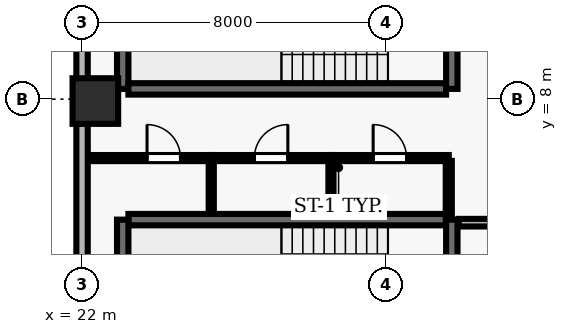
"""IFC4 building model, lengths in metres.
Left out: names, types, materials, properties, quantities, classifications, styles, units other than length and angle.
Written with IfcOpenShell. Run it as: python <this file> out.ifc"""

import sys

from ifc_helpers import new_model, si_unit, direction, frame, frame_2d, origin, origin_2d, place, context, subcontext, project, spatial, rectangle, extrude, element, fill, save


model = new_model("IFC4")
c1 = context("Model", 3, precision=1e-05, world=origin(), true_north=direction((0.0, 1.0)))
c2 = subcontext(c1, "Body", "Model", "MODEL_VIEW")
j1 = project(units=[si_unit("LENGTHUNIT", "METRE"), si_unit("PLANEANGLEUNIT", "RADIAN")], contexts=[c1])
p1 = place(None, origin())
s1 = spatial("IfcSite", under=j1, at=p1, CompositionType="ELEMENT")
p2 = place(p1, origin())
s2 = spatial("IfcBuilding", under=s1, at=p2, CompositionType="ELEMENT")
p3 = place(p2, frame((0.0, 0.0, 122.9)))
s3 = spatial("IfcBuildingStorey", under=s2, at=p3, CompositionType="ELEMENT", Elevation=122.9)
p4 = place(p3, frame((22.35, 7.95, 0.0), z_axis=(0.0, 0.0, 1.0), x_axis=(1.0, 0.0, 0.0)))
e1 = element("IfcColumn", 1, at=p4, inside=s3, PredefinedType="COLUMN", context=c2, shape_type="SweptSolid", body=[
    extrude(rectangle(XDim=1.2, YDim=1.2, at=origin_2d()), origin(), (0.0, 0.0, 1.0), 3.9),
])
p5 = place(p3, frame((22.0, 46.1, 0.0), z_axis=(0.0, 0.0, 1.0), x_axis=(0.0, -1.0, 0.0)))
e2 = element("IfcWall", 2, at=p5, inside=s3, PredefinedType="SOLIDWALL", context=c2, shape_type="SweptSolid", body=[
    extrude(rectangle(XDim=43.6, YDim=0.3, at=frame_2d((21.8, 0.0))), origin(), (0.0, 0.0, 1.0), 3.69),
])
p6 = place(p5, frame((12.7, 0.0, 0.0)))
e3 = element("IfcOpeningElement", 3, at=p6, cuts=e2, PredefinedType="OPENING", context=c2, shape_type="SweptSolid", body=[
    extrude(rectangle(XDim=1.0, YDim=2.2, at=frame_2d((0.5, 1.1))), frame((0.0, 0.16, 0.0), z_axis=(0.0, -1.0, 0.0), x_axis=(1.0, 0.0, 0.0)), (0.0, 0.0, 1.0), 0.32),
])
p7 = place(p5, frame((1.975, 0.0, 0.9)))
e4 = element("IfcOpeningElement", 4, at=p7, cuts=e2, PredefinedType="OPENING", context=c2, shape_type="SweptSolid", body=[
    extrude(rectangle(XDim=1.5, YDim=1.8, at=frame_2d((0.75, 0.9))), frame((0.0, 0.16, 0.0), z_axis=(0.0, -1.0, 0.0), x_axis=(1.0, 0.0, 0.0)), (0.0, 0.0, 1.0), 0.32),
])
p8 = place(p5, frame((6.975, 0.0, 0.9)))
e5 = element("IfcOpeningElement", 5, at=p8, cuts=e2, PredefinedType="OPENING", context=c2, shape_type="SweptSolid", body=[
    extrude(rectangle(XDim=1.5, YDim=1.8, at=frame_2d((0.75, 0.9))), frame((0.0, 0.16, 0.0), z_axis=(0.0, -1.0, 0.0), x_axis=(1.0, 0.0, 0.0)), (0.0, 0.0, 1.0), 0.32),
])
p9 = place(p5, frame((17.875, 0.0, 0.9)))
e6 = element("IfcOpeningElement", 6, at=p9, cuts=e2, PredefinedType="OPENING", context=c2, shape_type="SweptSolid", body=[
    extrude(rectangle(XDim=1.5, YDim=1.8, at=frame_2d((0.75, 0.9))), frame((0.0, 0.16, 0.0), z_axis=(0.0, -1.0, 0.0), x_axis=(1.0, 0.0, 0.0)), (0.0, 0.0, 1.0), 0.32),
])
p10 = place(p5, frame((23.775, 0.0, 0.9)))
e7 = element("IfcOpeningElement", 7, at=p10, cuts=e2, PredefinedType="OPENING", context=c2, shape_type="SweptSolid", body=[
    extrude(rectangle(XDim=1.5, YDim=1.8, at=frame_2d((0.75, 0.9))), frame((0.0, 0.16, 0.0), z_axis=(0.0, -1.0, 0.0), x_axis=(1.0, 0.0, 0.0)), (0.0, 0.0, 1.0), 0.32),
])
p11 = place(p5, frame((28.775, 0.0, 0.9)))
e8 = element("IfcOpeningElement", 8, at=p11, cuts=e2, PredefinedType="OPENING", context=c2, shape_type="SweptSolid", body=[
    extrude(rectangle(XDim=1.5, YDim=1.8, at=frame_2d((0.75, 0.9))), frame((0.0, 0.16, 0.0), z_axis=(0.0, -1.0, 0.0), x_axis=(1.0, 0.0, 0.0)), (0.0, 0.0, 1.0), 0.32),
])
p12 = place(p5, frame((34.675, 0.0, 0.9)))
e9 = element("IfcOpeningElement", 9, at=p12, cuts=e2, PredefinedType="OPENING", context=c2, shape_type="SweptSolid", body=[
    extrude(rectangle(XDim=1.5, YDim=1.8, at=frame_2d((0.75, 0.9))), frame((0.0, 0.16, 0.0), z_axis=(0.0, -1.0, 0.0), x_axis=(1.0, 0.0, 0.0)), (0.0, 0.0, 1.0), 0.32),
])
p13 = place(p3, frame((31.58, 4.83, 0.0), z_axis=(0.0, 0.0, 1.0), x_axis=(-1.0, 0.0, 0.0)))
e10 = element("IfcWall", 10, at=p13, inside=s3, PredefinedType="SHEAR", context=c2, shape_type="SweptSolid", body=[
    extrude(rectangle(XDim=8.36, YDim=0.3, at=frame_2d((4.18, 0.0))), origin(), (0.0, 0.0, 1.0), 3.69),
])
p14 = place(p3, frame((23.07, 4.83, 0.0), z_axis=(0.0, 0.0, 1.0), x_axis=(0.0, -1.0, 0.0)))
e11 = element("IfcWall", 11, at=p14, inside=s3, PredefinedType="SHEAR", context=c2, shape_type="SweptSolid", body=[
    extrude(rectangle(XDim=3.51, YDim=0.3, at=frame_2d((1.755, 0.0))), origin(), (0.0, 0.0, 1.0), 3.69),
])
p15 = place(p3, frame((31.73, 0.96, 0.0), z_axis=(0.0, 0.0, 1.0), x_axis=(0.0, 1.0, 0.0)))
e12 = element("IfcWall", 12, at=p15, inside=s3, PredefinedType="SHEAR", context=c2, shape_type="SweptSolid", body=[
    extrude(rectangle(XDim=3.87, YDim=0.3, at=frame_2d((1.935, 0.0))), origin(), (0.0, 0.0, 1.0), 3.69),
])
p16 = place(p15, frame((1.54, 0.0, 0.0)))
e13 = element("IfcOpeningElement", 13, at=p16, cuts=e12, PredefinedType="OPENING", context=c2, shape_type="SweptSolid", body=[
    extrude(rectangle(XDim=1.15, YDim=2.15, at=frame_2d((0.575, 1.075))), frame((0.0, 0.16, 0.0), z_axis=(0.0, -1.0, 0.0), x_axis=(1.0, 0.0, 0.0)), (0.0, 0.0, 1.0), 0.32),
])
p17 = place(p3, frame((23.07, 11.78, 0.0), z_axis=(0.0, 0.0, 1.0), x_axis=(0.0, -1.0, 0.0)))
e14 = element("IfcWall", 14, at=p17, inside=s3, PredefinedType="SHEAR", context=c2, shape_type="SweptSolid", body=[
    extrude(rectangle(XDim=3.51, YDim=0.3, at=frame_2d((1.755, 0.0))), origin(), (0.0, 0.0, 1.0), 3.69),
])
p18 = place(p3, frame((23.22, 8.27, 0.0), z_axis=(0.0, 0.0, 1.0), x_axis=(1.0, 0.0, 0.0)))
e15 = element("IfcWall", 15, at=p18, inside=s3, PredefinedType="SHEAR", context=c2, shape_type="SweptSolid", body=[
    extrude(rectangle(XDim=8.36, YDim=0.3, at=frame_2d((4.18, 0.0))), origin(), (0.0, 0.0, 1.0), 3.69),
])
p19 = place(p3, frame((31.73, 8.27, 0.0), z_axis=(0.0, 0.0, 1.0), x_axis=(0.0, 1.0, 0.0)))
e16 = element("IfcWall", 16, at=p19, inside=s3, PredefinedType="SHEAR", context=c2, shape_type="SweptSolid", body=[
    extrude(rectangle(XDim=3.51, YDim=0.3, at=frame_2d((1.755, 0.0))), origin(), (0.0, 0.0, 1.0), 3.69),
])
p20 = place(p19, frame((1.18, 0.0, 0.0)))
e17 = element("IfcOpeningElement", 17, at=p20, cuts=e16, PredefinedType="OPENING", context=c2, shape_type="SweptSolid", body=[
    extrude(rectangle(XDim=1.15, YDim=2.15, at=frame_2d((0.575, 1.075))), frame((0.0, 0.16, 0.0), z_axis=(0.0, -1.0, 0.0), x_axis=(1.0, 0.0, 0.0)), (0.0, 0.0, 1.0), 0.32),
])
p21 = place(p3, frame((22.2, 6.45, 0.0), z_axis=(0.0, 0.0, 1.0), x_axis=(1.0, 0.0, 0.0)))
e18 = element("IfcWall", 18, at=p21, inside=s3, PredefinedType="PARTITIONING", context=c2, shape_type="SweptSolid", body=[
    extrude(rectangle(XDim=3.2, YDim=0.16, at=frame_2d((1.6, 0.0))), origin(), (0.0, 0.0, 1.0), 3.69),
])
p22 = place(p21, frame((1.51, 0.0, 0.0)))
e19 = element("IfcOpeningElement", 19, at=p22, cuts=e18, PredefinedType="OPENING", context=c2, shape_type="SweptSolid", body=[
    extrude(rectangle(XDim=0.88, YDim=2.1, at=frame_2d((0.44, 1.05))), frame((0.0, 0.09, 0.0), z_axis=(0.0, -1.0, 0.0), x_axis=(1.0, 0.0, 0.0)), (0.0, 0.0, 1.0), 0.18),
])
p23 = place(p3, frame((25.4, 6.45, 0.0), z_axis=(0.0, 0.0, 1.0), x_axis=(1.0, 0.0, 0.0)))
e20 = element("IfcWall", 20, at=p23, inside=s3, PredefinedType="PARTITIONING", context=c2, shape_type="SweptSolid", body=[
    extrude(rectangle(XDim=3.15, YDim=0.16, at=frame_2d((1.575, 0.0))), origin(), (0.0, 0.0, 1.0), 3.69),
])
p24 = place(p23, frame((1.135, 0.0, 0.0)))
e21 = element("IfcOpeningElement", 21, at=p24, cuts=e20, PredefinedType="OPENING", context=c2, shape_type="SweptSolid", body=[
    extrude(rectangle(XDim=0.88, YDim=2.1, at=frame_2d((0.44, 1.05))), frame((0.0, 0.09, 0.0), z_axis=(0.0, -1.0, 0.0), x_axis=(1.0, 0.0, 0.0)), (0.0, 0.0, 1.0), 0.18),
])
p25 = place(p3, frame((28.55, 6.45, 0.0), z_axis=(0.0, 0.0, 1.0), x_axis=(1.0, 0.0, 0.0)))
e22 = element("IfcWall", 22, at=p25, inside=s3, PredefinedType="PARTITIONING", context=c2, shape_type="SweptSolid", body=[
    extrude(rectangle(XDim=3.1, YDim=0.16, at=frame_2d((1.55, 0.0))), origin(), (0.0, 0.0, 1.0), 3.69),
])
p26 = place(p25, frame((1.11, 0.0, 0.0)))
e23 = element("IfcOpeningElement", 23, at=p26, cuts=e22, PredefinedType="OPENING", context=c2, shape_type="SweptSolid", body=[
    extrude(rectangle(XDim=0.88, YDim=2.1, at=frame_2d((0.44, 1.05))), frame((0.0, 0.09, 0.0), z_axis=(0.0, -1.0, 0.0), x_axis=(1.0, 0.0, 0.0)), (0.0, 0.0, 1.0), 0.18),
])
p27 = place(p3, frame((35.02, 4.75, 0.0), z_axis=(0.0, 0.0, 1.0), x_axis=(-1.0, 0.0, 0.0)))
e24 = element("IfcWall", 24, at=p27, inside=s3, PredefinedType="SOLIDWALL", context=c2, shape_type="SweptSolid", body=[
    extrude(rectangle(XDim=3.11, YDim=0.2, at=frame_2d((1.555, 0.0))), origin(), (0.0, 0.0, 1.0), 3.69),
])
p28 = place(p27, frame((1.03, 0.0, 0.0)))
e25 = element("IfcOpeningElement", 25, at=p28, cuts=e24, PredefinedType="OPENING", context=c2, shape_type="SweptSolid", body=[
    extrude(rectangle(XDim=1.05, YDim=2.15, at=frame_2d((0.525, 1.075))), frame((0.0, 0.11, 0.0), z_axis=(0.0, -1.0, 0.0), x_axis=(1.0, 0.0, 0.0)), (0.0, 0.0, 1.0), 0.22),
])
for number, where, z_axis, x_axis in (
    (26, (25.4, 5.01, 0.0), (0.0, 0.0, 1.0), (0.0, 1.0, 0.0)),
    (27, (28.55, 5.01, 0.0), (0.0, 0.0, 1.0), (0.0, 1.0, 0.0)),
):
    element("IfcWall", number, at=place(p3, frame(where, z_axis=z_axis, x_axis=x_axis)), inside=s3, PredefinedType="PARTITIONING", context=c2, shape_type="SweptSolid", body=[
        extrude(rectangle(XDim=1.365, YDim=0.135, at=frame_2d((0.683, 0.0))), origin(), (0.0, 0.0, 1.0), 3.69),
    ])
p29 = place(p3, frame((31.65, 4.86, 0.0), z_axis=(0.0, 0.0, 1.0), x_axis=(0.0, 1.0, 0.0)))
e28 = element("IfcWall", 28, at=p29, inside=s3, PredefinedType="PARTITIONING", context=c2, shape_type="SweptSolid", body=[
    extrude(rectangle(XDim=1.515, YDim=0.16, at=frame_2d((0.757, 0.0))), origin(), (0.0, 0.0, 1.0), 3.69),
])
p30 = place(p22, origin())
e29 = element("IfcDoor", 29, at=p30, inside=s3, OperationType="SINGLE_SWING_LEFT", PredefinedType="DOOR", context=c2, shape_type="SweptSolid", body=[
    extrude(rectangle(XDim=0.88, YDim=2.1, at=frame_2d((0.44, 1.05))), frame((0.0, 0.025, 0.0), z_axis=(0.0, -1.0, 0.0), x_axis=(1.0, 0.0, 0.0)), (0.0, 0.0, 1.0), 0.05),
])
fill(e19, e29)
p31 = place(p24, origin())
e30 = element("IfcDoor", 30, at=p31, inside=s3, OperationType="SINGLE_SWING_RIGHT", PredefinedType="DOOR", context=c2, shape_type="SweptSolid", body=[
    extrude(rectangle(XDim=0.88, YDim=2.1, at=frame_2d((0.44, 1.05))), frame((0.0, 0.025, 0.0), z_axis=(0.0, -1.0, 0.0), x_axis=(1.0, 0.0, 0.0)), (0.0, 0.0, 1.0), 0.05),
])
fill(e21, e30)
p32 = place(p26, origin())
e31 = element("IfcDoor", 31, at=p32, inside=s3, OperationType="SINGLE_SWING_LEFT", PredefinedType="DOOR", context=c2, shape_type="SweptSolid", body=[
    extrude(rectangle(XDim=0.88, YDim=2.1, at=frame_2d((0.44, 1.05))), frame((0.0, 0.025, 0.0), z_axis=(0.0, -1.0, 0.0), x_axis=(1.0, 0.0, 0.0)), (0.0, 0.0, 1.0), 0.05),
])
fill(e23, e31)
save(model, sys.argv[1])
